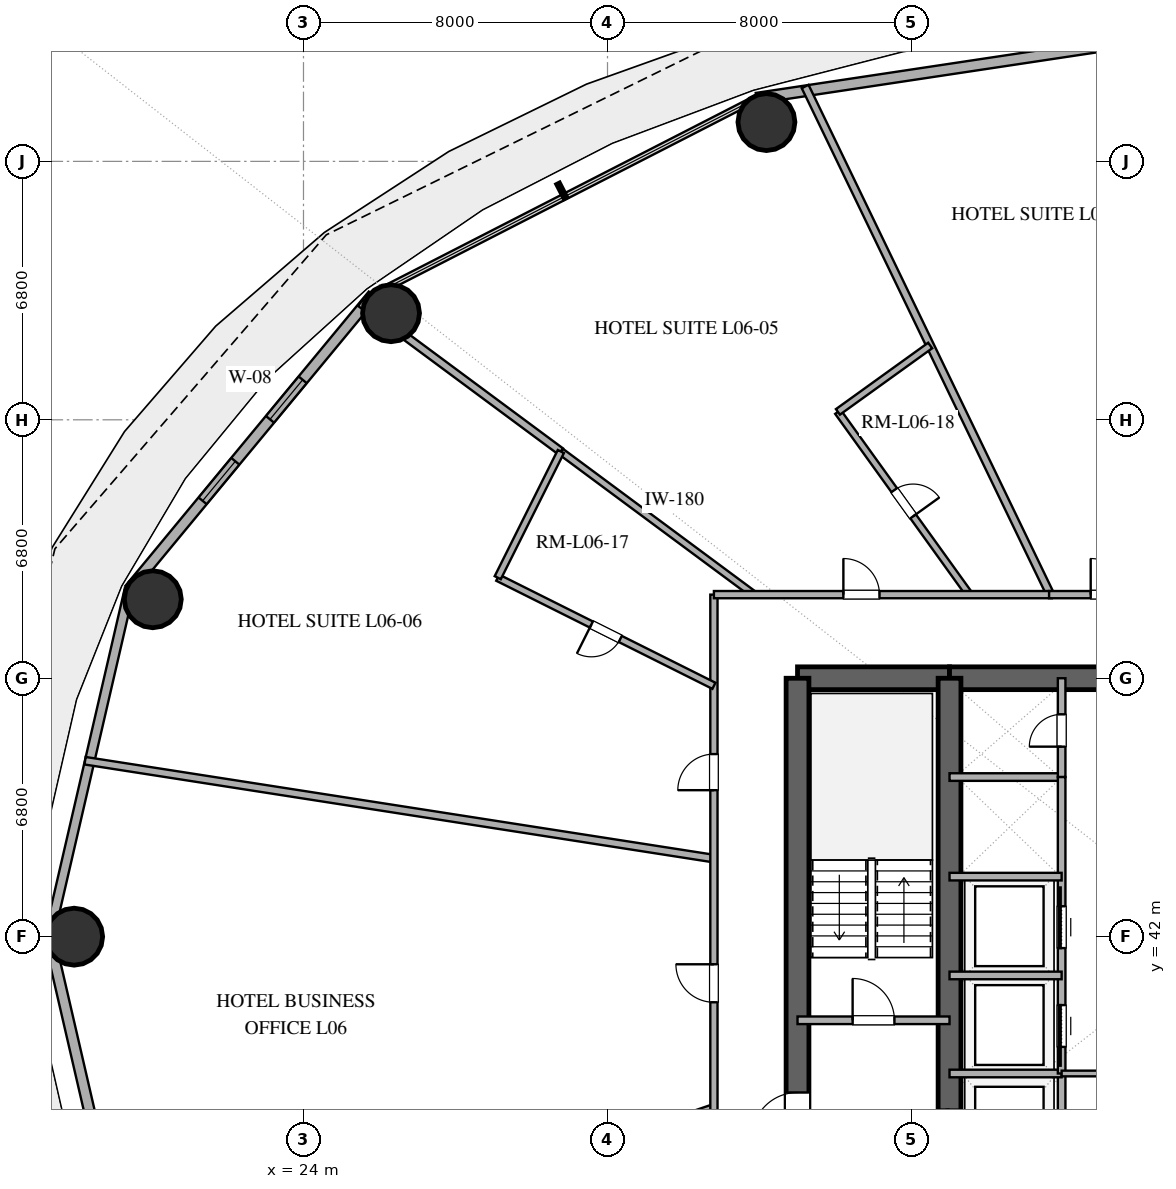
"""IFC4 building model, lengths in metres.
Left out: names, types, materials, properties, quantities, classifications, styles, units other than length and angle.
Written with IfcOpenShell. Run it as: python <this file> out.ifc"""

import sys

from ifc_helpers import new_model, si_unit, direction, frame, frame_2d, origin, origin_2d, place, context, subcontext, project, spatial, rectangle, hollow_circle, extrude, element, fill, save


model = new_model("IFC4")
c1 = context("Model", 3, precision=1e-05, world=origin(), true_north=direction((0.0, 1.0)))
c2 = subcontext(c1, "Body", "Model", "MODEL_VIEW")
j1 = project(units=[si_unit("LENGTHUNIT", "METRE"), si_unit("PLANEANGLEUNIT", "RADIAN")], contexts=[c1])
p1 = place(None, origin())
s1 = spatial("IfcSite", under=j1, at=p1, CompositionType="ELEMENT")
p2 = place(p1, origin())
s2 = spatial("IfcBuilding", under=s1, at=p2, CompositionType="ELEMENT")
p3 = place(p2, frame((0.0, 0.0, 31.8)))
s3 = spatial("IfcBuildingStorey", under=s2, at=p3, CompositionType="ELEMENT", Elevation=31.8)
p4 = place(p3, frame((37.0, 48.8, 0.0), z_axis=(0.0, 0.0, 1.0), x_axis=(1.0, 0.0, 0.0)))
e1 = element("IfcWall", 1, at=p4, inside=s3, PredefinedType="SHEAR", context=c2, shape_type="SweptSolid", body=[
    extrude(rectangle(XDim=4.0, YDim=0.6, at=frame_2d((2.0, 0.0))), origin(), (0.0, 0.0, 1.0), 3.38),
])
p5 = place(p3, frame((41.0, 48.8, 0.0), z_axis=(0.0, 0.0, 1.0), x_axis=(1.0, 0.0, 0.0)))
e2 = element("IfcWall", 2, at=p5, inside=s3, PredefinedType="SHEAR", context=c2, shape_type="SweptSolid", body=[
    extrude(rectangle(XDim=14.0, YDim=0.6, at=frame_2d((7.0, 0.0))), origin(), (0.0, 0.0, 1.0), 3.38),
])
p6 = place(p5, frame((6.1, 0.0, 0.0)))
e3 = element("IfcOpeningElement", 3, at=p6, cuts=e2, PredefinedType="OPENING", context=c2, shape_type="SweptSolid", body=[
    extrude(rectangle(XDim=1.8, YDim=2.25, at=frame_2d((0.9, 1.125))), frame((0.0, 0.31, 0.0), z_axis=(0.0, -1.0, 0.0), x_axis=(1.0, 0.0, 0.0)), (0.0, 0.0, 1.0), 0.62),
])
p7 = place(p3, frame((37.0, 35.2, 0.0), z_axis=(0.0, 0.0, 1.0), x_axis=(0.0, 1.0, 0.0)))
e4 = element("IfcWall", 4, at=p7, inside=s3, PredefinedType="SHEAR", context=c2, shape_type="SweptSolid", body=[
    extrude(rectangle(XDim=13.6, YDim=0.6, at=frame_2d((6.8, 0.0))), origin(), (0.0, 0.0, 1.0), 3.38),
])
p8 = place(p7, frame((1.5, 0.0, 0.0)))
e5 = element("IfcOpeningElement", 5, at=p8, cuts=e4, PredefinedType="OPENING", context=c2, shape_type="SweptSolid", body=[
    extrude(rectangle(XDim=1.2, YDim=2.15, at=frame_2d((0.6, 1.075))), frame((0.0, 0.31, 0.0), z_axis=(0.0, -1.0, 0.0), x_axis=(1.0, 0.0, 0.0)), (0.0, 0.0, 1.0), 0.62),
])
p9 = place(p3, frame((41.0, 35.2, 0.0), z_axis=(0.0, 0.0, 1.0), x_axis=(0.0, 1.0, 0.0)))
e6 = element("IfcWall", 6, at=p9, inside=s3, PredefinedType="SHEAR", context=c2, shape_type="SweptSolid", body=[
    extrude(rectangle(XDim=13.6, YDim=0.6, at=frame_2d((6.8, 0.0))), origin(), (0.0, 0.0, 1.0), 3.38),
])
p10 = place(p9, frame((1.15, 0.0, 0.0)))
e7 = element("IfcOpeningElement", 7, at=p10, cuts=e6, PredefinedType="OPENING", context=c2, shape_type="SweptSolid", body=[
    extrude(rectangle(XDim=1.1, YDim=2.2, at=frame_2d((0.55, 1.1))), frame((0.0, 0.31, 0.0), z_axis=(0.0, -1.0, 0.0), x_axis=(1.0, 0.0, 0.0)), (0.0, 0.0, 1.0), 0.62),
])
for number, where, z_axis, x_axis in (
    (8, (36.182, 63.434, 0.0), (0.0, 0.0, 1.0), (1.0, 0.0, 0.0)),
    (9, (26.303, 58.405, 0.0), (0.0, 0.0, 1.0), (1.0, 0.0, 0.0)),
    (10, (20.034, 50.878, 0.0), (0.0, 0.0, 1.0), (1.0, 0.0, 0.0)),
    (11, (17.965, 42.0, 0.0), (0.0, 0.0, 1.0), (1.0, 0.0, 0.0)),
):
    element("IfcColumn", number, at=place(p3, frame(where, z_axis=z_axis, x_axis=x_axis)), inside=s3, PredefinedType="COLUMN", context=c2, shape_type="SweptSolid", body=[
        extrude(hollow_circle(Radius=0.75, WallThickness=0.04, at=origin_2d()), origin(), (0.0, 0.0, 1.0), 3.38),
    ])
p11 = place(p3, frame((48.0, 65.88, 0.0), z_axis=(0.0, 0.0, 1.0), x_axis=(-0.988864835849, -0.148816452121, 0.0)))
e12 = element("IfcWall", 12, at=p11, inside=s3, PredefinedType="SOLIDWALL", context=c2, shape_type="SweptSolid", body=[
    extrude(rectangle(XDim=12.214, YDim=0.28, at=frame_2d((6.107, 0.0))), origin(), (0.0, 0.0, 1.0), 3.38),
])
p12 = place(p11, frame((1.531, 0.0, 0.0)))
e13 = element("IfcOpeningElement", 13, at=p12, cuts=e12, PredefinedType="OPENING", context=c2, shape_type="SweptSolid", body=[
    extrude(rectangle(XDim=1.05, YDim=2.2, at=frame_2d((0.525, 1.1))), frame((0.0, 0.15, 0.0), z_axis=(0.0, -1.0, 0.0), x_axis=(1.0, 0.0, 0.0)), (0.0, 0.0, 1.0), 0.3),
])
p13 = place(p3, frame((25.826, 58.886, 0.0), z_axis=(0.0, 0.0, 1.0), x_axis=(-0.637296809613, -0.770618437657, 0.0)))
e14 = element("IfcWall", 14, at=p13, inside=s3, PredefinedType="SOLIDWALL", context=c2, shape_type="SweptSolid", body=[
    extrude(rectangle(XDim=10.053, YDim=0.28, at=frame_2d((5.027, 0.0))), origin(), (0.0, 0.0, 1.0), 3.38),
])
p14 = place(p13, frame((2.898, 0.0, 0.85)))
e15 = element("IfcOpeningElement", 15, at=p14, cuts=e14, PredefinedType="OPENING", context=c2, shape_type="SweptSolid", body=[
    extrude(rectangle(XDim=1.35, YDim=1.8, at=frame_2d((0.675, 0.9))), frame((0.0, 0.15, 0.0), z_axis=(0.0, -1.0, 0.0), x_axis=(1.0, 0.0, 0.0)), (0.0, 0.0, 1.0), 0.3),
])
p15 = place(p13, frame((5.68, 0.0, 0.85)))
e16 = element("IfcOpeningElement", 16, at=p15, cuts=e14, PredefinedType="OPENING", context=c2, shape_type="SweptSolid", body=[
    extrude(rectangle(XDim=1.35, YDim=1.8, at=frame_2d((0.675, 0.9))), frame((0.0, 0.15, 0.0), z_axis=(0.0, -1.0, 0.0), x_axis=(1.0, 0.0, 0.0)), (0.0, 0.0, 1.0), 0.3),
])
p16 = place(p3, frame((19.419, 51.138, 0.0), z_axis=(0.0, 0.0, 1.0), x_axis=(-0.225454452941, -0.974253709076, 0.0)))
e17 = element("IfcWall", 17, at=p16, inside=s3, PredefinedType="SOLIDWALL", context=c2, shape_type="SweptSolid", body=[
    extrude(rectangle(XDim=9.38, YDim=0.25, at=frame_2d((4.69, 0.0))), origin(), (0.0, 0.0, 1.0), 3.38),
])
p17 = place(p3, frame((17.304, 42.0, 0.0), z_axis=(0.0, 0.0, 1.0), x_axis=(0.225454452941, -0.974253709076, 0.0)))
e18 = element("IfcWall", 18, at=p17, inside=s3, PredefinedType="SOLIDWALL", context=c2, shape_type="SweptSolid", body=[
    extrude(rectangle(XDim=9.38, YDim=0.28, at=frame_2d((4.69, 0.0))), origin(), (0.0, 0.0, 1.0), 3.38),
])
p18 = place(p17, frame((6.235, 0.0, 0.0)))
e19 = element("IfcOpeningElement", 19, at=p18, cuts=e18, PredefinedType="OPENING", context=c2, shape_type="SweptSolid", body=[
    extrude(rectangle(XDim=1.6, YDim=2.25, at=frame_2d((0.8, 1.125))), frame((0.0, 0.15, 0.0), z_axis=(0.0, -1.0, 0.0), x_axis=(1.0, 0.0, 0.0)), (0.0, 0.0, 1.0), 0.3),
])
p19 = place(p3, frame((37.0, 39.8, 0.0), z_axis=(0.0, 0.0, 1.0), x_axis=(1.0, 0.0, 0.0)))
e20 = element("IfcWall", 20, at=p19, inside=s3, PredefinedType="SOLIDWALL", context=c2, shape_type="SweptSolid", body=[
    extrude(rectangle(XDim=4.0, YDim=0.2, at=frame_2d((2.0, 0.0))), origin(), (0.0, 0.0, 1.0), 2.74),
])
p20 = place(p19, frame((1.45, 0.0, 0.0)))
e21 = element("IfcOpeningElement", 21, at=p20, cuts=e20, PredefinedType="OPENING", context=c2, shape_type="SweptSolid", body=[
    extrude(rectangle(XDim=1.1, YDim=2.15, at=frame_2d((0.55, 1.075))), frame((0.0, 0.11, 0.0), z_axis=(0.0, -1.0, 0.0), x_axis=(1.0, 0.0, 0.0)), (0.0, 0.0, 1.0), 0.22),
])
p21 = place(p3, frame((43.95, 35.2, 0.0), z_axis=(0.0, 0.0, 1.0), x_axis=(0.0, 1.0, 0.0)))
e22 = element("IfcWall", 22, at=p21, inside=s3, PredefinedType="SOLIDWALL", context=c2, shape_type="SweptSolid", body=[
    extrude(rectangle(XDim=3.2, YDim=0.2, at=frame_2d((1.6, 0.0))), origin(), (0.0, 0.0, 1.0), 2.74),
])
for number, where, z_axis, x_axis in (
    (23, (41.0, 38.4, 0.0), (0.0, 0.0, 1.0), (1.0, 0.0, 0.0)),
    (24, (41.0, 46.2, 0.0), (0.0, 0.0, 1.0), (1.0, 0.0, 0.0)),
):
    element("IfcWall", number, at=place(p3, frame(where, z_axis=z_axis, x_axis=x_axis)), inside=s3, PredefinedType="SOLIDWALL", context=c2, shape_type="SweptSolid", body=[
        extrude(rectangle(XDim=2.95, YDim=0.2, at=frame_2d((1.475, 0.0))), origin(), (0.0, 0.0, 1.0), 2.74),
    ])
p22 = place(p3, frame((43.95, 46.2, 0.0), z_axis=(0.0, 0.0, 1.0), x_axis=(0.0, 1.0, 0.0)))
e25 = element("IfcWall", 25, at=p22, inside=s3, PredefinedType="SOLIDWALL", context=c2, shape_type="SweptSolid", body=[
    extrude(rectangle(XDim=2.6, YDim=0.2, at=frame_2d((1.3, 0.0))), origin(), (0.0, 0.0, 1.0), 2.74),
])
p23 = place(p22, frame((0.8, 0.0, 0.0)))
e26 = element("IfcOpeningElement", 26, at=p23, cuts=e25, PredefinedType="OPENING", context=c2, shape_type="SweptSolid", body=[
    extrude(rectangle(XDim=0.85, YDim=2.15, at=frame_2d((0.425, 1.075))), frame((0.0, 0.11, 0.0), z_axis=(0.0, -1.0, 0.0), x_axis=(1.0, 0.0, 0.0)), (0.0, 0.0, 1.0), 0.22),
])
p24 = place(p3, frame((43.95, 38.4, 0.0), z_axis=(0.0, 0.0, 1.0), x_axis=(0.0, 1.0, 0.0)))
e27 = element("IfcWall", 27, at=p24, inside=s3, PredefinedType="SOLIDWALL", context=c2, shape_type="SweptSolid", body=[
    extrude(rectangle(XDim=7.8, YDim=0.2, at=frame_2d((3.9, 0.0))), origin(), (0.0, 0.0, 1.0), 2.74),
])
p25 = place(p24, frame((0.7, 0.0, 0.0)))
e28 = element("IfcOpeningElement", 28, at=p25, cuts=e27, PredefinedType="OPENING", context=c2, shape_type="SweptSolid", body=[
    extrude(rectangle(XDim=1.1, YDim=2.2, at=frame_2d((0.55, 1.1))), frame((0.0, 0.11, 0.0), z_axis=(0.0, -1.0, 0.0), x_axis=(1.0, 0.0, 0.0)), (0.0, 0.0, 1.0), 0.22),
])
p26 = place(p24, frame((3.3, 0.0, 0.0)))
e29 = element("IfcOpeningElement", 29, at=p26, cuts=e27, PredefinedType="OPENING", context=c2, shape_type="SweptSolid", body=[
    extrude(rectangle(XDim=1.1, YDim=2.2, at=frame_2d((0.55, 1.1))), frame((0.0, 0.11, 0.0), z_axis=(0.0, -1.0, 0.0), x_axis=(1.0, 0.0, 0.0)), (0.0, 0.0, 1.0), 0.22),
])
for number, where, z_axis, x_axis in (
    (30, (41.0, 40.98, 0.0), (0.0, 0.0, 1.0), (1.0, 0.0, 0.0)),
    (31, (41.0, 43.58, 0.0), (0.0, 0.0, 1.0), (1.0, 0.0, 0.0)),
):
    element("IfcWall", number, at=place(p3, frame(where, z_axis=z_axis, x_axis=x_axis)), inside=s3, PredefinedType="SOLIDWALL", context=c2, shape_type="SweptSolid", body=[
        extrude(rectangle(XDim=2.95, YDim=0.2, at=frame_2d((1.475, 0.0))), origin(), (0.0, 0.0, 1.0), 2.74),
    ])
p27 = place(p3, frame((43.95, 38.4, 0.0), z_axis=(0.0, 0.0, 1.0), x_axis=(1.0, 0.0, 0.0)))
e32 = element("IfcWall", 32, at=p27, inside=s3, PredefinedType="PARTITIONING", context=c2, shape_type="SweptSolid", body=[
    extrude(rectangle(XDim=2.9, YDim=0.15, at=frame_2d((1.45, 0.0))), origin(), (0.0, 0.0, 1.0), 2.74),
])
p28 = place(p3, frame((18.253, 46.63, 0.0), z_axis=(0.0, 0.0, 1.0), x_axis=(0.988105936892, -0.153774697134, 0.0)))
e33 = element("IfcWall", 33, at=p28, inside=s3, PredefinedType="PARTITIONING", context=c2, shape_type="SweptSolid", body=[
    extrude(rectangle(XDim=16.747, YDim=0.2, at=frame_2d((8.373, 0.0))), origin(), (0.0, 0.0, 1.0), 2.74),
])
p29 = place(p3, frame((34.8, 37.494, 0.0), z_axis=(0.0, 0.0, 1.0), x_axis=(-0.946390715793, -0.32302416792, 0.0)))
e34 = element("IfcWall", 34, at=p29, inside=s3, PredefinedType="PARTITIONING", context=c2, shape_type="SweptSolid", body=[
    extrude(rectangle(XDim=15.952, YDim=0.2, at=frame_2d((7.976, 0.0))), origin(), (0.0, 0.0, 1.0), 2.74),
])
p30 = place(p3, frame((43.655, 51.0, 0.0), z_axis=(0.0, 0.0, 1.0), x_axis=(-0.434738949034, 0.900556520266, 0.0)))
e35 = element("IfcWall", 35, at=p30, inside=s3, PredefinedType="PARTITIONING", context=c2, shape_type="SweptSolid", body=[
    extrude(rectangle(XDim=14.847, YDim=0.2, at=frame_2d((7.424, 0.0))), origin(), (0.0, 0.0, 1.0), 2.74),
])
p31 = place(p3, frame((34.8, 33.0, 0.0), z_axis=(0.0, 0.0, 1.0), x_axis=(0.0, 1.0, 0.0)))
e36 = element("IfcWall", 36, at=p31, inside=s3, PredefinedType="PARTITIONING", context=c2, shape_type="SweptSolid", body=[
    extrude(rectangle(XDim=18.0, YDim=0.19, at=frame_2d((9.0, 0.0))), origin(), (0.0, 0.0, 1.0), 2.74),
])
p32 = place(p31, frame((7.274, 0.0, 0.0)))
e37 = element("IfcOpeningElement", 37, at=p32, cuts=e36, PredefinedType="OPENING", context=c2, shape_type="SweptSolid", body=[
    extrude(rectangle(XDim=1.0, YDim=2.2, at=frame_2d((0.5, 1.1))), frame((0.0, 0.105, 0.0), z_axis=(0.0, -1.0, 0.0), x_axis=(1.0, 0.0, 0.0)), (0.0, 0.0, 1.0), 0.21),
])
p33 = place(p31, frame((12.854, 0.0, 0.0)))
e38 = element("IfcOpeningElement", 38, at=p33, cuts=e36, PredefinedType="OPENING", context=c2, shape_type="SweptSolid", body=[
    extrude(rectangle(XDim=0.95, YDim=2.15, at=frame_2d((0.475, 1.075))), frame((0.0, 0.105, 0.0), z_axis=(0.0, -1.0, 0.0), x_axis=(1.0, 0.0, 0.0)), (0.0, 0.0, 1.0), 0.21),
])
p34 = place(p3, frame((25.496, 58.675, 0.0), z_axis=(0.0, 0.0, 1.0), x_axis=(0.803457728354, -0.595361804912, 0.0)))
e39 = element("IfcWall", 39, at=p34, inside=s3, PredefinedType="PARTITIONING", context=c2, shape_type="SweptSolid", body=[
    extrude(rectangle(XDim=6.566, YDim=0.2, at=frame_2d((3.283, 0.0))), origin(), (0.0, 0.0, 1.0), 2.74),
])
p35 = place(p3, frame((34.8, 48.601, 0.0), z_axis=(0.0, 0.0, 1.0), x_axis=(-0.894404156958, 0.447259660617, 0.0)))
e40 = element("IfcWall", 40, at=p35, inside=s3, PredefinedType="PLUMBINGWALL", context=c2, shape_type="SweptSolid", body=[
    extrude(rectangle(XDim=6.36, YDim=0.18, at=frame_2d((3.18, 0.0))), origin(), (0.0, 0.0, 1.0), 2.74),
])
p36 = place(p35, frame((2.755, 0.0, 0.0)))
e41 = element("IfcOpeningElement", 41, at=p36, cuts=e40, PredefinedType="OPENING", context=c2, shape_type="SweptSolid", body=[
    extrude(rectangle(XDim=0.85, YDim=2.1, at=frame_2d((0.425, 1.05))), frame((0.0, 0.1, 0.0), z_axis=(0.0, -1.0, 0.0), x_axis=(1.0, 0.0, 0.0)), (0.0, 0.0, 1.0), 0.2),
])
p37 = place(p3, frame((30.772, 54.766, 0.0), z_axis=(0.0, 0.0, 1.0), x_axis=(0.803451199128, -0.595370616187, 0.0)))
e42 = element("IfcWall", 42, at=p37, inside=s3, PredefinedType="PLUMBINGWALL", context=c2, shape_type="SweptSolid", body=[
    extrude(rectangle(XDim=6.325, YDim=0.18, at=frame_2d((3.163, 0.0))), origin(), (0.0, 0.0, 1.0), 2.74),
])
p38 = place(p3, frame((38.063, 55.809, 0.0), z_axis=(0.0, 0.0, 1.0), x_axis=(0.584084318507, -0.811692989297, 0.0)))
e43 = element("IfcWall", 43, at=p38, inside=s3, PredefinedType="PLUMBINGWALL", context=c2, shape_type="SweptSolid", body=[
    extrude(rectangle(XDim=5.924, YDim=0.18, at=frame_2d((2.962, 0.0))), origin(), (0.0, 0.0, 1.0), 2.74),
])
p39 = place(p38, frame((2.537, 0.0, 0.0)))
e44 = element("IfcOpeningElement", 44, at=p39, cuts=e43, PredefinedType="OPENING", context=c2, shape_type="SweptSolid", body=[
    extrude(rectangle(XDim=0.85, YDim=2.1, at=frame_2d((0.425, 1.05))), frame((0.0, 0.1, 0.0), z_axis=(0.0, -1.0, 0.0), x_axis=(1.0, 0.0, 0.0)), (0.0, 0.0, 1.0), 0.2),
])
p40 = place(p3, frame((34.8, 51.0, 0.0), z_axis=(0.0, 0.0, 1.0), x_axis=(1.0, 0.0, 0.0)))
e45 = element("IfcWall", 45, at=p40, inside=s3, PredefinedType="PARTITIONING", context=c2, shape_type="SweptSolid", body=[
    extrude(rectangle(XDim=8.891, YDim=0.19, at=frame_2d((4.445, 0.0))), origin(), (0.0, 0.0, 1.0), 2.74),
])
p41 = place(p40, frame((3.407, 0.0, 0.0)))
e46 = element("IfcOpeningElement", 46, at=p41, cuts=e45, PredefinedType="OPENING", context=c2, shape_type="SweptSolid", body=[
    extrude(rectangle(XDim=0.95, YDim=2.15, at=frame_2d((0.475, 1.075))), frame((0.0, 0.105, 0.0), z_axis=(0.0, -1.0, 0.0), x_axis=(1.0, 0.0, 0.0)), (0.0, 0.0, 1.0), 0.21),
])
p42 = place(p3, frame((29.112, 51.446, 0.0), z_axis=(0.0, 0.0, 1.0), x_axis=(0.447292516126, 0.894387726334, 0.0)))
e47 = element("IfcWall", 47, at=p42, inside=s3, PredefinedType="PLUMBINGWALL", context=c2, shape_type="SweptSolid", body=[
    extrude(rectangle(XDim=3.712, YDim=0.18, at=frame_2d((1.856, 0.0))), origin(), (0.0, 0.0, 1.0), 2.74),
])
p43 = place(p3, frame((43.62, 51.0, 0.0), z_axis=(0.0, 0.0, 1.0), x_axis=(1.0, 0.0, 0.0)))
e48 = element("IfcWall", 48, at=p43, inside=s3, PredefinedType="PARTITIONING", context=c2, shape_type="SweptSolid", body=[
    extrude(rectangle(XDim=4.683, YDim=0.19, at=frame_2d((2.341, 0.0))), origin(), (0.0, 0.0, 1.0), 2.74),
])
p44 = place(p43, frame((1.095, 0.0, 0.0)))
e49 = element("IfcOpeningElement", 49, at=p44, cuts=e48, PredefinedType="OPENING", context=c2, shape_type="SweptSolid", body=[
    extrude(rectangle(XDim=0.95, YDim=2.15, at=frame_2d((0.475, 1.075))), frame((0.0, 0.105, 0.0), z_axis=(0.0, -1.0, 0.0), x_axis=(1.0, 0.0, 0.0)), (0.0, 0.0, 1.0), 0.21),
])
p45 = place(p3, frame((40.49, 57.555, 0.0), z_axis=(0.0, 0.0, 1.0), x_axis=(-0.811670601443, -0.584115429305, 0.0)))
e50 = element("IfcWall", 50, at=p45, inside=s3, PredefinedType="PLUMBINGWALL", context=c2, shape_type="SweptSolid", body=[
    extrude(rectangle(XDim=2.99, YDim=0.18, at=frame_2d((1.495, 0.0))), origin(), (0.0, 0.0, 1.0), 2.74),
])
p46 = place(p14, origin())
e51 = element("IfcWindow", 51, at=p46, inside=s3, PartitioningType="SINGLE_PANEL", PredefinedType="WINDOW", context=c2, shape_type="SweptSolid", body=[
    extrude(rectangle(XDim=1.35, YDim=1.8, at=frame_2d((0.675, 0.9))), frame((0.0, 0.03, 0.0), z_axis=(0.0, -1.0, 0.0), x_axis=(1.0, 0.0, 0.0)), (0.0, 0.0, 1.0), 0.06),
])
fill(e15, e51)
p47 = place(p15, origin())
e52 = element("IfcWindow", 52, at=p47, inside=s3, PartitioningType="SINGLE_PANEL", PredefinedType="WINDOW", context=c2, shape_type="SweptSolid", body=[
    extrude(rectangle(XDim=1.35, YDim=1.8, at=frame_2d((0.675, 0.9))), frame((0.0, 0.03, 0.0), z_axis=(0.0, -1.0, 0.0), x_axis=(1.0, 0.0, 0.0)), (0.0, 0.0, 1.0), 0.06),
])
fill(e16, e52)
p48 = place(p8, origin())
e53 = element("IfcDoor", 53, at=p48, inside=s3, OperationType="SINGLE_SWING_LEFT", PredefinedType="DOOR", context=c2, shape_type="SweptSolid", body=[
    extrude(rectangle(XDim=1.2, YDim=2.15, at=frame_2d((0.6, 1.075))), frame((0.0, 0.025, 0.0), z_axis=(0.0, -1.0, 0.0), x_axis=(1.0, 0.0, 0.0)), (0.0, 0.0, 1.0), 0.05),
])
fill(e5, e53)
p49 = place(p20, origin())
e54 = element("IfcDoor", 54, at=p49, inside=s3, OperationType="SINGLE_SWING_LEFT", PredefinedType="DOOR", context=c2, shape_type="SweptSolid", body=[
    extrude(rectangle(XDim=1.1, YDim=2.15, at=frame_2d((0.55, 1.075))), frame((0.0, 0.025, 0.0), z_axis=(0.0, -1.0, 0.0), x_axis=(1.0, 0.0, 0.0)), (0.0, 0.0, 1.0), 0.05),
])
fill(e21, e54)
p50 = place(p23, origin())
e55 = element("IfcDoor", 55, at=p50, inside=s3, OperationType="SINGLE_SWING_LEFT", PredefinedType="DOOR", context=c2, shape_type="SweptSolid", body=[
    extrude(rectangle(XDim=0.85, YDim=2.15, at=frame_2d((0.425, 1.075))), frame((0.0, 0.025, 0.0), z_axis=(0.0, -1.0, 0.0), x_axis=(1.0, 0.0, 0.0)), (0.0, 0.0, 1.0), 0.05),
])
fill(e26, e55)
p51 = place(p25, origin())
e56 = element("IfcDoor", 56, at=p51, inside=s3, OperationType="SLIDING_TO_LEFT", PredefinedType="DOOR", context=c2, shape_type="SweptSolid", body=[
    extrude(rectangle(XDim=1.1, YDim=2.2, at=frame_2d((0.55, 1.1))), frame((0.0, 0.025, 0.0), z_axis=(0.0, -1.0, 0.0), x_axis=(1.0, 0.0, 0.0)), (0.0, 0.0, 1.0), 0.05),
])
fill(e28, e56)
p52 = place(p26, origin())
e57 = element("IfcDoor", 57, at=p52, inside=s3, OperationType="SLIDING_TO_RIGHT", PredefinedType="DOOR", context=c2, shape_type="SweptSolid", body=[
    extrude(rectangle(XDim=1.1, YDim=2.2, at=frame_2d((0.55, 1.1))), frame((0.0, 0.025, 0.0), z_axis=(0.0, -1.0, 0.0), x_axis=(1.0, 0.0, 0.0)), (0.0, 0.0, 1.0), 0.05),
])
fill(e29, e57)
p53 = place(p32, origin())
e58 = element("IfcDoor", 58, at=p53, inside=s3, OperationType="SINGLE_SWING_RIGHT", PredefinedType="DOOR", context=c2, shape_type="SweptSolid", body=[
    extrude(rectangle(XDim=1.0, YDim=2.2, at=frame_2d((0.5, 1.1))), frame((0.0, 0.025, 0.0), z_axis=(0.0, -1.0, 0.0), x_axis=(1.0, 0.0, 0.0)), (0.0, 0.0, 1.0), 0.05),
])
fill(e37, e58)
p54 = place(p33, origin())
e59 = element("IfcDoor", 59, at=p54, inside=s3, OperationType="SINGLE_SWING_LEFT", PredefinedType="DOOR", context=c2, shape_type="SweptSolid", body=[
    extrude(rectangle(XDim=0.95, YDim=2.15, at=frame_2d((0.475, 1.075))), frame((0.0, 0.025, 0.0), z_axis=(0.0, -1.0, 0.0), x_axis=(1.0, 0.0, 0.0)), (0.0, 0.0, 1.0), 0.05),
])
fill(e38, e59)
p55 = place(p36, origin())
e60 = element("IfcDoor", 60, at=p55, inside=s3, OperationType="SINGLE_SWING_RIGHT", PredefinedType="DOOR", context=c2, shape_type="SweptSolid", body=[
    extrude(rectangle(XDim=0.85, YDim=2.1, at=frame_2d((0.425, 1.05))), frame((0.0, 0.025, 0.0), z_axis=(0.0, -1.0, 0.0), x_axis=(1.0, 0.0, 0.0)), (0.0, 0.0, 1.0), 0.05),
])
fill(e41, e60)
p56 = place(p39, origin())
e61 = element("IfcDoor", 61, at=p56, inside=s3, OperationType="SINGLE_SWING_RIGHT", PredefinedType="DOOR", context=c2, shape_type="SweptSolid", body=[
    extrude(rectangle(XDim=0.85, YDim=2.1, at=frame_2d((0.425, 1.05))), frame((0.0, 0.025, 0.0), z_axis=(0.0, -1.0, 0.0), x_axis=(1.0, 0.0, 0.0)), (0.0, 0.0, 1.0), 0.05),
])
fill(e44, e61)
p57 = place(p41, origin())
e62 = element("IfcDoor", 62, at=p57, inside=s3, OperationType="SINGLE_SWING_LEFT", PredefinedType="DOOR", context=c2, shape_type="SweptSolid", body=[
    extrude(rectangle(XDim=0.95, YDim=2.15, at=frame_2d((0.475, 1.075))), frame((0.0, 0.025, 0.0), z_axis=(0.0, -1.0, 0.0), x_axis=(1.0, 0.0, 0.0)), (0.0, 0.0, 1.0), 0.05),
])
fill(e46, e62)
p58 = place(p44, origin())
e63 = element("IfcDoor", 63, at=p58, inside=s3, OperationType="SINGLE_SWING_LEFT", PredefinedType="DOOR", context=c2, shape_type="SweptSolid", body=[
    extrude(rectangle(XDim=0.95, YDim=2.15, at=frame_2d((0.475, 1.075))), frame((0.0, 0.025, 0.0), z_axis=(0.0, -1.0, 0.0), x_axis=(1.0, 0.0, 0.0)), (0.0, 0.0, 1.0), 0.05),
])
fill(e49, e63)
save(model, sys.argv[1])
